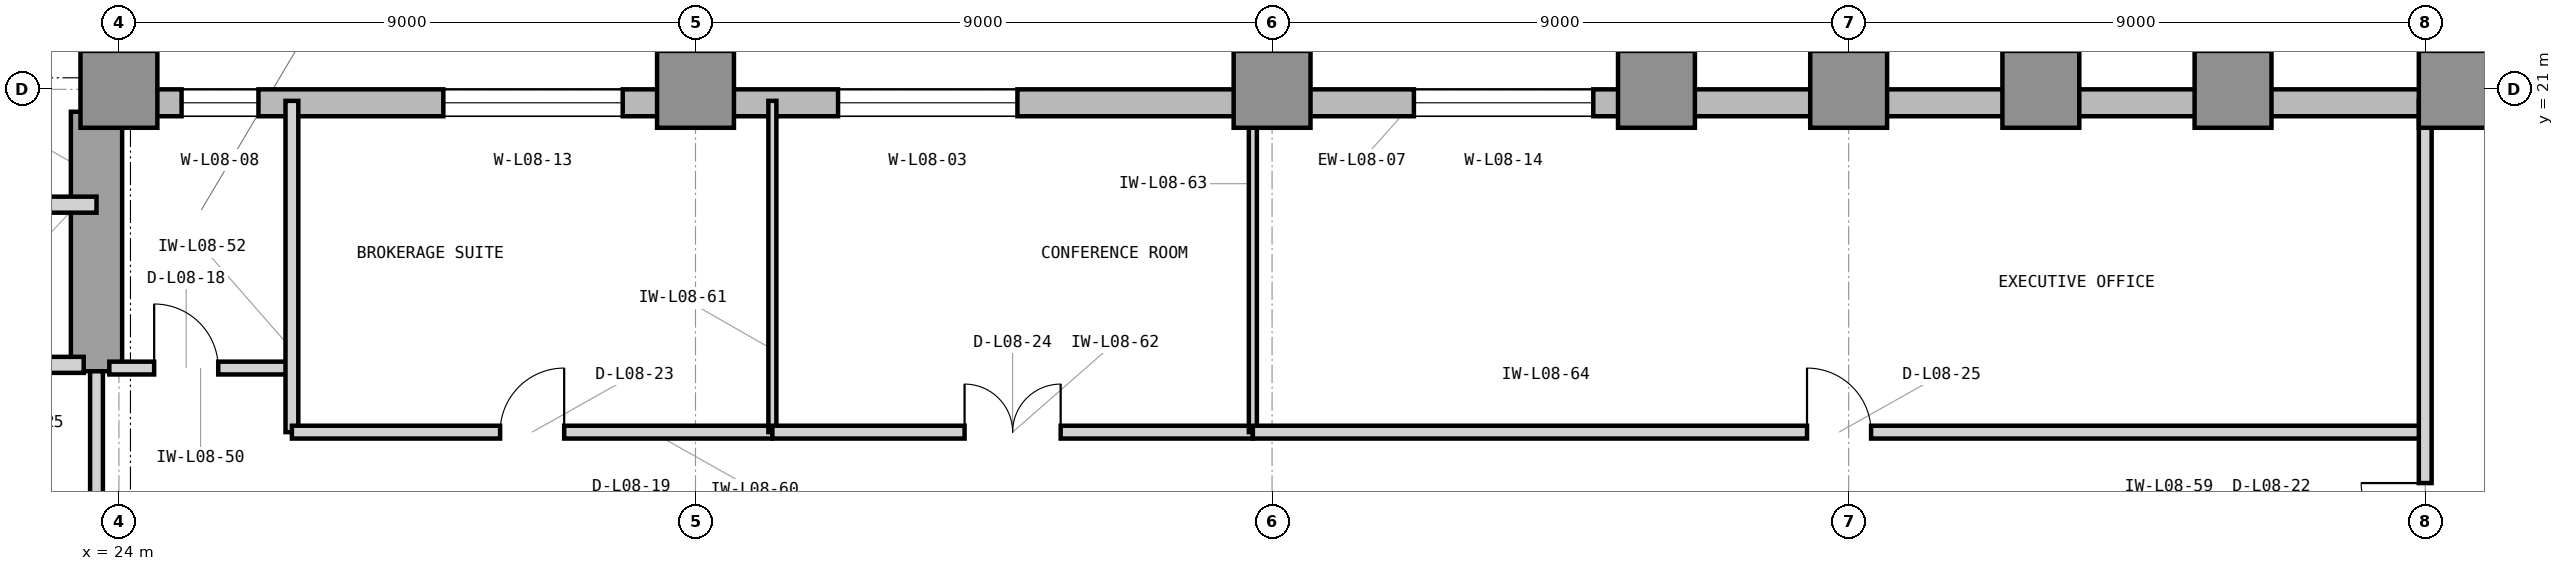
"""IFC4 building model, lengths in metres.
Left out: names, types, materials, properties, quantities, classifications, styles, units other than length and angle.
Written with IfcOpenShell. Run it as: python <this file> out.ifc"""

import sys

from ifc_helpers import new_model, si_unit, direction, frame, frame_2d, origin, origin_2d, place, context, subcontext, project, spatial, rectangle, extrude, element, fill, save


model = new_model("IFC4")
c1 = context("Model", 3, precision=1e-05, world=origin(), true_north=direction((0.0, 1.0)))
c2 = subcontext(c1, "Body", "Model", "MODEL_VIEW")
j1 = project(units=[si_unit("LENGTHUNIT", "METRE"), si_unit("PLANEANGLEUNIT", "RADIAN")], contexts=[c1])
p1 = place(None, origin())
s1 = spatial("IfcSite", under=j1, at=p1, CompositionType="ELEMENT")
p2 = place(p1, origin())
s2 = spatial("IfcBuilding", under=s1, at=p2, CompositionType="ELEMENT")
p3 = place(p2, frame((0.0, 0.0, 38.4)))
s3 = spatial("IfcBuildingStorey", under=s2, at=p3, CompositionType="ELEMENT", Elevation=38.4)
p4 = place(p3, frame((23.65, 16.6, 0.0), z_axis=(0.0, 0.0, 1.0), x_axis=(0.0, 1.0, 0.0)))
e1 = element("IfcWall", 1, at=p4, inside=s3, PredefinedType="SHEAR", context=c2, shape_type="SweptSolid", body=[
    extrude(rectangle(XDim=4.05, YDim=0.8, at=frame_2d((2.025, 0.0))), origin(), (0.0, 0.0, 1.0), 4.2),
])
for number, where, z_axis, x_axis in (
    (2, (24.0, 21.0, 0.0), (0.0, 0.0, 1.0), (1.0, 0.0, 0.0)),
    (3, (33.0, 21.0, 0.0), (0.0, 0.0, 1.0), (1.0, 0.0, 0.0)),
    (4, (42.0, 21.0, 0.0), (0.0, 0.0, 1.0), (1.0, 0.0, 0.0)),
    (5, (48.0, 21.0, 0.0), (0.0, 0.0, 1.0), (1.0, 0.0, 0.0)),
    (6, (51.0, 21.0, 0.0), (0.0, 0.0, 1.0), (1.0, 0.0, 0.0)),
    (7, (54.0, 21.0, 0.0), (0.0, 0.0, 1.0), (1.0, 0.0, 0.0)),
    (8, (57.0, 21.0, 0.0), (0.0, 0.0, 1.0), (1.0, 0.0, 0.0)),
    (9, (60.5, 21.0, 0.0), (0.0, 0.0, 1.0), (1.0, 0.0, 0.0)),
):
    element("IfcColumn", number, at=place(p3, frame(where, z_axis=z_axis, x_axis=x_axis)), inside=s3, PredefinedType="COLUMN", context=c2, shape_type="SweptSolid", body=[
        extrude(rectangle(XDim=1.2, YDim=1.2, at=origin_2d()), origin(), (0.0, 0.0, 1.0), 4.2),
    ])
p5 = place(p3, frame((64.4, 20.79, 0.0), z_axis=(0.0, 0.0, 1.0), x_axis=(-1.0, 0.0, 0.0)))
e10 = element("IfcWall", 10, at=p5, inside=s3, PredefinedType="STANDARD", context=c2, shape_type="SweptSolid", body=[
    extrude(rectangle(XDim=40.4, YDim=0.42, at=frame_2d((20.2, 0.0))), origin(), (0.0, 0.0, 1.0), 3.98),
])
p6 = place(p5, frame((26.375, 0.0, 0.85)))
e11 = element("IfcOpeningElement", 11, at=p6, cuts=e10, PredefinedType="OPENING", context=c2, shape_type="SweptSolid", body=[
    extrude(rectangle(XDim=2.8, YDim=2.45, at=frame_2d((1.4, 1.225))), frame((0.0, 0.22, 0.0), z_axis=(0.0, -1.0, 0.0), x_axis=(1.0, 0.0, 0.0)), (0.0, 0.0, 1.0), 0.44),
])
p7 = place(p5, frame((38.222, 0.0, 0.85)))
e12 = element("IfcOpeningElement", 12, at=p7, cuts=e10, PredefinedType="OPENING", context=c2, shape_type="SweptSolid", body=[
    extrude(rectangle(XDim=1.2, YDim=2.45, at=frame_2d((0.6, 1.225))), frame((0.0, 0.22, 0.0), z_axis=(0.0, -1.0, 0.0), x_axis=(1.0, 0.0, 0.0)), (0.0, 0.0, 1.0), 0.44),
])
p8 = place(p5, frame((32.536, 0.0, 0.85)))
e13 = element("IfcOpeningElement", 13, at=p8, cuts=e10, PredefinedType="OPENING", context=c2, shape_type="SweptSolid", body=[
    extrude(rectangle(XDim=2.8, YDim=2.45, at=frame_2d((1.4, 1.225))), frame((0.0, 0.22, 0.0), z_axis=(0.0, -1.0, 0.0), x_axis=(1.0, 0.0, 0.0)), (0.0, 0.0, 1.0), 0.44),
])
p9 = place(p5, frame((17.386, 0.0, 0.85)))
e14 = element("IfcOpeningElement", 14, at=p9, cuts=e10, PredefinedType="OPENING", context=c2, shape_type="SweptSolid", body=[
    extrude(rectangle(XDim=2.8, YDim=2.45, at=frame_2d((1.4, 1.225))), frame((0.0, 0.22, 0.0), z_axis=(0.0, -1.0, 0.0), x_axis=(1.0, 0.0, 0.0)), (0.0, 0.0, 1.0), 0.44),
])
p10 = place(p3, frame((23.79, 21.0, 0.0), z_axis=(0.0, 0.0, 1.0), x_axis=(0.0, 1.0, 0.0)))
e15 = element("IfcWall", 15, at=p10, inside=s3, PredefinedType="STANDARD", context=c2, shape_type="SweptSolid", body=[
    extrude(rectangle(XDim=28.4, YDim=0.42, at=frame_2d((14.2, 0.0))), origin(), (0.0, 0.0, 1.0), 3.98),
])
p11 = place(p10, frame((10.433, 0.0, 0.85)))
e16 = element("IfcOpeningElement", 16, at=p11, cuts=e15, PredefinedType="OPENING", context=c2, shape_type="SweptSolid", body=[
    extrude(rectangle(XDim=2.8, YDim=2.45, at=frame_2d((1.4, 1.225))), frame((0.0, 0.22, 0.0), z_axis=(0.0, -1.0, 0.0), x_axis=(1.0, 0.0, 0.0)), (0.0, 0.0, 1.0), 0.44),
])
p12 = place(p10, frame((16.016, 0.0, 0.85)))
e17 = element("IfcOpeningElement", 17, at=p12, cuts=e15, PredefinedType="OPENING", context=c2, shape_type="SweptSolid", body=[
    extrude(rectangle(XDim=1.2, YDim=2.45, at=frame_2d((0.6, 1.225))), frame((0.0, 0.22, 0.0), z_axis=(0.0, -1.0, 0.0), x_axis=(1.0, 0.0, 0.0)), (0.0, 0.0, 1.0), 0.44),
])
p13 = place(p3, frame((21.05, 16.7, 0.0), z_axis=(0.0, 0.0, 1.0), x_axis=(1.0, 0.0, 0.0)))
e18 = element("IfcWall", 18, at=p13, inside=s3, PredefinedType="PARTITIONING", context=c2, shape_type="SweptSolid", body=[
    extrude(rectangle(XDim=2.4, YDim=0.25, at=frame_2d((1.2, 0.0))), origin(), (0.0, 0.0, 1.0), 3.426),
])
p14 = place(p3, frame((16.45, 19.2, 0.0), z_axis=(0.0, 0.0, 1.0), x_axis=(1.0, 0.0, 0.0)))
e19 = element("IfcWall", 19, at=p14, inside=s3, PredefinedType="PARTITIONING", context=c2, shape_type="SweptSolid", body=[
    extrude(rectangle(XDim=7.2, YDim=0.25, at=frame_2d((3.6, 0.0))), origin(), (0.0, 0.0, 1.0), 3.97),
])
p15 = place(p3, frame((23.65, 13.6, 0.0), z_axis=(0.0, 0.0, 1.0), x_axis=(0.0, 1.0, 0.0)))
e20 = element("IfcWall", 20, at=p15, inside=s3, PredefinedType="PARTITIONING", context=c2, shape_type="SweptSolid", body=[
    extrude(rectangle(XDim=3.0, YDim=0.2, at=frame_2d((1.5, 0.0))), origin(), (0.0, 0.0, 1.0), 3.97),
])
p16 = place(p3, frame((23.85, 16.65, 0.0), z_axis=(0.0, 0.0, 1.0), x_axis=(1.0, 0.0, 0.0)))
e21 = element("IfcWall", 21, at=p16, inside=s3, PredefinedType="PARTITIONING", context=c2, shape_type="SweptSolid", body=[
    extrude(rectangle(XDim=2.85, YDim=0.2, at=frame_2d((1.425, 0.0))), origin(), (0.0, 0.0, 1.0), 3.97),
])
p17 = place(p16, frame((0.7, 0.0, 0.0)))
e22 = element("IfcOpeningElement", 22, at=p17, cuts=e21, PredefinedType="OPENING", context=c2, shape_type="SweptSolid", body=[
    extrude(rectangle(XDim=1.0, YDim=2.15, at=frame_2d((0.5, 1.075))), frame((0.0, 0.11, 0.0), z_axis=(0.0, -1.0, 0.0), x_axis=(1.0, 0.0, 0.0)), (0.0, 0.0, 1.0), 0.22),
])
p18 = place(p3, frame((26.7, 15.65, 0.0), z_axis=(0.0, 0.0, 1.0), x_axis=(0.0, 1.0, 0.0)))
e23 = element("IfcWall", 23, at=p18, inside=s3, PredefinedType="PARTITIONING", context=c2, shape_type="SweptSolid", body=[
    extrude(rectangle(XDim=5.17, YDim=0.2, at=frame_2d((2.585, 0.0))), origin(), (0.0, 0.0, 1.0), 3.97),
])
p19 = place(p3, frame((26.7, 15.65, 0.0), z_axis=(0.0, 0.0, 1.0), x_axis=(1.0, 0.0, 0.0)))
e24 = element("IfcWall", 24, at=p19, inside=s3, PredefinedType="PARTITIONING", context=c2, shape_type="SweptSolid", body=[
    extrude(rectangle(XDim=7.5, YDim=0.2, at=frame_2d((3.75, 0.0))), origin(), (0.0, 0.0, 1.0), 3.97),
])
p20 = place(p19, frame((3.25, 0.0, 0.0)))
e25 = element("IfcOpeningElement", 25, at=p20, cuts=e24, PredefinedType="OPENING", context=c2, shape_type="SweptSolid", body=[
    extrude(rectangle(XDim=1.0, YDim=2.15, at=frame_2d((0.5, 1.075))), frame((0.0, 0.11, 0.0), z_axis=(0.0, -1.0, 0.0), x_axis=(1.0, 0.0, 0.0)), (0.0, 0.0, 1.0), 0.22),
])
p21 = place(p3, frame((34.2, 15.65, 0.0), z_axis=(0.0, 0.0, 1.0), x_axis=(0.0, 1.0, 0.0)))
e26 = element("IfcWall", 26, at=p21, inside=s3, PredefinedType="PARTITIONING", context=c2, shape_type="SweptSolid", body=[
    extrude(rectangle(XDim=5.17, YDim=0.125, at=frame_2d((2.585, 0.0))), origin(), (0.0, 0.0, 1.0), 3.97),
])
p22 = place(p3, frame((34.2, 15.65, 0.0), z_axis=(0.0, 0.0, 1.0), x_axis=(1.0, 0.0, 0.0)))
e27 = element("IfcWall", 27, at=p22, inside=s3, PredefinedType="PARTITIONING", context=c2, shape_type="SweptSolid", body=[
    extrude(rectangle(XDim=7.5, YDim=0.2, at=frame_2d((3.75, 0.0))), origin(), (0.0, 0.0, 1.0), 3.97),
])
p23 = place(p22, frame((3.0, 0.0, 0.0)))
e28 = element("IfcOpeningElement", 28, at=p23, cuts=e27, PredefinedType="OPENING", context=c2, shape_type="SweptSolid", body=[
    extrude(rectangle(XDim=1.5, YDim=2.3, at=frame_2d((0.75, 1.15))), frame((0.0, 0.11, 0.0), z_axis=(0.0, -1.0, 0.0), x_axis=(1.0, 0.0, 0.0)), (0.0, 0.0, 1.0), 0.22),
])
p24 = place(p3, frame((41.7, 15.65, 0.0), z_axis=(0.0, 0.0, 1.0), x_axis=(0.0, 1.0, 0.0)))
e29 = element("IfcWall", 29, at=p24, inside=s3, PredefinedType="PARTITIONING", context=c2, shape_type="SweptSolid", body=[
    extrude(rectangle(XDim=5.17, YDim=0.125, at=frame_2d((2.585, 0.0))), origin(), (0.0, 0.0, 1.0), 3.97),
])
p25 = place(p3, frame((41.7, 15.65, 0.0), z_axis=(0.0, 0.0, 1.0), x_axis=(1.0, 0.0, 0.0)))
e30 = element("IfcWall", 30, at=p25, inside=s3, PredefinedType="PARTITIONING", context=c2, shape_type="SweptSolid", body=[
    extrude(rectangle(XDim=18.3, YDim=0.2, at=frame_2d((9.15, 0.0))), origin(), (0.0, 0.0, 1.0), 3.97),
])
p26 = place(p25, frame((8.65, 0.0, 0.0)))
e31 = element("IfcOpeningElement", 31, at=p26, cuts=e30, PredefinedType="OPENING", context=c2, shape_type="SweptSolid", body=[
    extrude(rectangle(XDim=1.0, YDim=2.15, at=frame_2d((0.5, 1.075))), frame((0.0, 0.11, 0.0), z_axis=(0.0, -1.0, 0.0), x_axis=(1.0, 0.0, 0.0)), (0.0, 0.0, 1.0), 0.22),
])
p27 = place(p3, frame((60.0, 3.18, 0.0), z_axis=(0.0, 0.0, 1.0), x_axis=(0.0, 1.0, 0.0)))
e32 = element("IfcWall", 32, at=p27, inside=s3, PredefinedType="PARTITIONING", context=c2, shape_type="SweptSolid", body=[
    extrude(rectangle(XDim=17.64, YDim=0.2, at=frame_2d((8.82, 0.0))), origin(), (0.0, 0.0, 1.0), 3.97),
])
p28 = place(p27, frame((10.675, 0.0, 0.0)))
e33 = element("IfcOpeningElement", 33, at=p28, cuts=e32, PredefinedType="OPENING", context=c2, shape_type="SweptSolid", body=[
    extrude(rectangle(XDim=1.0, YDim=2.15, at=frame_2d((0.5, 1.075))), frame((0.0, 0.11, 0.0), z_axis=(0.0, -1.0, 0.0), x_axis=(1.0, 0.0, 0.0)), (0.0, 0.0, 1.0), 0.22),
])
p29 = place(p6, origin())
e34 = element("IfcWindow", 34, at=p29, inside=s3, PartitioningType="SINGLE_PANEL", PredefinedType="WINDOW", context=c2, shape_type="SweptSolid", body=[
    extrude(rectangle(XDim=2.8, YDim=2.45, at=frame_2d((1.4, 1.225))), frame((0.0, 0.11, 0.0), z_axis=(0.0, -1.0, 0.0), x_axis=(1.0, 0.0, 0.0)), (0.0, 0.0, 1.0), 0.06),
])
fill(e11, e34)
p30 = place(p17, origin())
e35 = element("IfcDoor", 35, at=p30, inside=s3, OperationType="SINGLE_SWING_LEFT", PredefinedType="DOOR", context=c2, shape_type="SweptSolid", body=[
    extrude(rectangle(XDim=1.0, YDim=2.15, at=frame_2d((0.5, 1.075))), frame((0.0, 0.025, 0.0), z_axis=(0.0, -1.0, 0.0), x_axis=(1.0, 0.0, 0.0)), (0.0, 0.0, 1.0), 0.05),
])
fill(e22, e35)
p31 = place(p20, origin())
e36 = element("IfcDoor", 36, at=p31, inside=s3, OperationType="SINGLE_SWING_RIGHT", PredefinedType="DOOR", context=c2, shape_type="SweptSolid", body=[
    extrude(rectangle(XDim=1.0, YDim=2.15, at=frame_2d((0.5, 1.075))), frame((0.0, 0.025, 0.0), z_axis=(0.0, -1.0, 0.0), x_axis=(1.0, 0.0, 0.0)), (0.0, 0.0, 1.0), 0.05),
])
fill(e25, e36)
p32 = place(p23, origin())
e37 = element("IfcDoor", 37, at=p32, inside=s3, OperationType="DOUBLE_DOOR_SINGLE_SWING", PredefinedType="DOOR", context=c2, shape_type="SweptSolid", body=[
    extrude(rectangle(XDim=1.5, YDim=2.3, at=frame_2d((0.75, 1.15))), frame((0.0, 0.025, 0.0), z_axis=(0.0, -1.0, 0.0), x_axis=(1.0, 0.0, 0.0)), (0.0, 0.0, 1.0), 0.05),
])
fill(e28, e37)
p33 = place(p26, origin())
e38 = element("IfcDoor", 38, at=p33, inside=s3, OperationType="SINGLE_SWING_LEFT", PredefinedType="DOOR", context=c2, shape_type="SweptSolid", body=[
    extrude(rectangle(XDim=1.0, YDim=2.15, at=frame_2d((0.5, 1.075))), frame((0.0, 0.025, 0.0), z_axis=(0.0, -1.0, 0.0), x_axis=(1.0, 0.0, 0.0)), (0.0, 0.0, 1.0), 0.05),
])
fill(e31, e38)
p34 = place(p28, origin())
e39 = element("IfcDoor", 39, at=p34, inside=s3, OperationType="SINGLE_SWING_RIGHT", PredefinedType="DOOR", context=c2, shape_type="SweptSolid", body=[
    extrude(rectangle(XDim=1.0, YDim=2.15, at=frame_2d((0.5, 1.075))), frame((0.0, 0.025, 0.0), z_axis=(0.0, -1.0, 0.0), x_axis=(1.0, 0.0, 0.0)), (0.0, 0.0, 1.0), 0.05),
])
fill(e33, e39)
p35 = place(p7, origin())
e40 = element("IfcWindow", 40, at=p35, inside=s3, PartitioningType="SINGLE_PANEL", PredefinedType="WINDOW", context=c2, shape_type="SweptSolid", body=[
    extrude(rectangle(XDim=1.2, YDim=2.45, at=frame_2d((0.6, 1.225))), frame((0.0, 0.11, 0.0), z_axis=(0.0, -1.0, 0.0), x_axis=(1.0, 0.0, 0.0)), (0.0, 0.0, 1.0), 0.06),
])
fill(e12, e40)
p36 = place(p8, origin())
e41 = element("IfcWindow", 41, at=p36, inside=s3, PartitioningType="SINGLE_PANEL", PredefinedType="WINDOW", context=c2, shape_type="SweptSolid", body=[
    extrude(rectangle(XDim=2.8, YDim=2.45, at=frame_2d((1.4, 1.225))), frame((0.0, 0.11, 0.0), z_axis=(0.0, -1.0, 0.0), x_axis=(1.0, 0.0, 0.0)), (0.0, 0.0, 1.0), 0.06),
])
fill(e13, e41)
p37 = place(p9, origin())
e42 = element("IfcWindow", 42, at=p37, inside=s3, PartitioningType="SINGLE_PANEL", PredefinedType="WINDOW", context=c2, shape_type="SweptSolid", body=[
    extrude(rectangle(XDim=2.8, YDim=2.45, at=frame_2d((1.4, 1.225))), frame((0.0, 0.11, 0.0), z_axis=(0.0, -1.0, 0.0), x_axis=(1.0, 0.0, 0.0)), (0.0, 0.0, 1.0), 0.06),
])
fill(e14, e42)
save(model, sys.argv[1])
